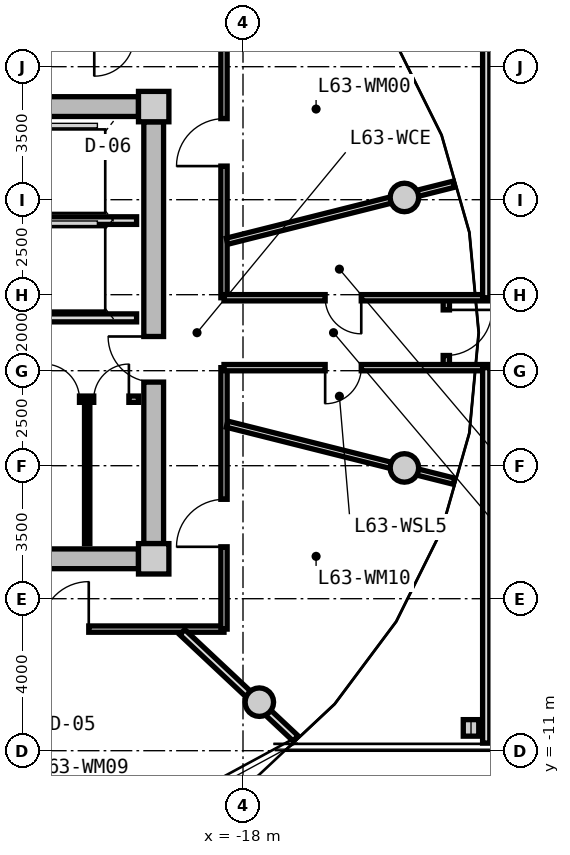
"""IFC4 building model, lengths in metres.
Left out: names, types, materials, properties, quantities, classifications, styles, units other than length and angle.
Written with IfcOpenShell. Run it as: python <this file> out.ifc"""

import sys

from ifc_helpers import new_model, si_unit, direction, frame, frame_2d, origin, origin_2d, place, context, subcontext, project, spatial, rectangle, circle, i_section, extrude, source, transform, mapped, element, fill, save


model = new_model("IFC4")
c1 = context("Model", 3, precision=1e-05, world=origin(), true_north=direction((0.0, 1.0)))
c2 = subcontext(c1, "Body", "Model", "MODEL_VIEW")
j1 = project(units=[si_unit("LENGTHUNIT", "METRE"), si_unit("PLANEANGLEUNIT", "RADIAN")], contexts=[c1])
p1 = place(None, origin())
s1 = spatial("IfcSite", under=j1, at=p1, CompositionType="ELEMENT")
p2 = place(p1, origin())
s2 = spatial("IfcBuilding", under=s1, at=p2, CompositionType="ELEMENT")
p3 = place(p2, frame((0.0, 0.0, 203.8)))
s3 = spatial("IfcBuildingStorey", under=s2, at=p3, CompositionType="ELEMENT", Elevation=203.8)
m1 = source(origin(), c2, "Body", "SweptSolid", [
    extrude(rectangle(XDim=0.8, YDim=0.8, at=origin_2d()), origin(), (0.0, 0.0, 1.0), 4.0),
])
for number, where, z_axis, x_axis in (
    (1, (-20.35, -5.95, 0.0), (0.0, 0.0, 1.0), (1.0, 0.0, 0.0)),
    (2, (-20.35, 5.95, 0.0), (0.0, 0.0, 1.0), (1.0, 0.0, 0.0)),
):
    element("IfcColumn", number, at=place(p3, frame(where, z_axis=z_axis, x_axis=x_axis)), inside=s3, PredefinedType="COLUMN", context=c2, shape_type="MappedRepresentation", body=[
        mapped(m1, transform((0.0, 0.0, 0.0), x_axis=(1.0, 0.0, 0.0), y_axis=(0.0, 1.0, 0.0), z_axis=(0.0, 0.0, 1.0), scale=1.0)),
    ])
m2 = source(origin(), c2, "Body", "SweptSolid", [
    extrude(rectangle(XDim=14.5, YDim=0.52, at=frame_2d((7.25, 0.0))), origin(), (0.0, 0.0, 1.0), 3.71),
])
for number, where, z_axis, x_axis in (
    (3, (-35.25, 5.95, 0.0), (0.0, 0.0, 1.0), (1.0, 0.0, 0.0)),
    (4, (-20.75, -5.95, 0.0), (0.0, 0.0, 1.0), (-1.0, 0.0, 0.0)),
):
    element("IfcWall", number, at=place(p3, frame(where, z_axis=z_axis, x_axis=x_axis)), inside=s3, PredefinedType="SHEAR", context=c2, shape_type="MappedRepresentation", body=[
        mapped(m2, transform((0.0, 0.0, 0.0), x_axis=(1.0, 0.0, 0.0), y_axis=(0.0, 1.0, 0.0), z_axis=(0.0, 0.0, 1.0), scale=1.0)),
    ])
m3 = source(origin(), c2, "Body", "SweptSolid", [
    extrude(rectangle(XDim=11.1, YDim=0.52, at=frame_2d((5.55, 0.0))), origin(), (0.0, 0.0, 1.0), 3.71),
])
p4 = place(p3, frame((-20.35, 5.55, 0.0), z_axis=(0.0, 0.0, 1.0), x_axis=(0.0, -1.0, 0.0)))
e5 = element("IfcWall", 5, at=p4, inside=s3, PredefinedType="SHEAR", context=c2, shape_type="MappedRepresentation", body=[
    mapped(m3, transform((0.0, 0.0, 0.0), x_axis=(1.0, 0.0, 0.0), y_axis=(0.0, 1.0, 0.0), z_axis=(0.0, 0.0, 1.0), scale=1.0)),
])
p5 = place(p4, frame((5.65, 0.0, 0.0)))
e6 = element("IfcOpeningElement", 6, at=p5, cuts=e5, PredefinedType="OPENING", context=c2, shape_type="SweptSolid", body=[
    extrude(rectangle(XDim=1.2, YDim=2.15, at=frame_2d((0.6, 1.075))), frame((0.0, 0.27, 0.0), z_axis=(0.0, -1.0, 0.0), x_axis=(1.0, 0.0, 0.0)), (0.0, 0.0, 1.0), 0.54),
])
m4 = source(origin(), c2, "Body", "SweptSolid", [
    extrude(circle(Radius=0.375, at=origin_2d()), origin(), (0.0, 0.0, 1.0), 4.0),
])
for number, where, z_axis, x_axis in (
    (7, (-13.753, 3.559, 0.0), (0.0, 0.0, 1.0), (1.0, 0.0, 0.0)),
    (8, (-17.57, -9.723, 0.0), (0.0, 0.0, 1.0), (1.0, 0.0, 0.0)),
    (9, (-13.753, -3.559, 0.0), (0.0, 0.0, 1.0), (1.0, 0.0, 0.0)),
):
    element("IfcColumn", number, at=place(p3, frame(where, z_axis=z_axis, x_axis=x_axis)), inside=s3, PredefinedType="COLUMN", context=c2, shape_type="MappedRepresentation", body=[
        mapped(m4, transform((0.0, 0.0, 0.0), x_axis=(1.0, 0.0, 0.0), y_axis=(0.0, 1.0, 0.0), z_axis=(0.0, 0.0, 1.0), scale=1.0)),
    ])
m5 = source(origin(), c2, "Body", "SweptSolid", [
    extrude(i_section(OverallWidth=0.407, OverallDepth=0.435, WebThickness=0.024, FlangeThickness=0.039, FilletRadius=0.015, at=origin_2d()), origin(), (0.0, 0.0, 1.0), 4.0),
])
p6 = place(p3, frame((-12.0, -10.4, 0.0), z_axis=(0.0, 0.0, 1.0), x_axis=(1.0, 0.0, 0.0)))
e10 = element("IfcColumn", 10, at=p6, inside=s3, PredefinedType="COLUMN", context=c2, shape_type="MappedRepresentation", body=[
    mapped(m5, transform((0.0, 0.0, 0.0), x_axis=(1.0, 0.0, 0.0), y_axis=(0.0, 1.0, 0.0), z_axis=(0.0, 0.0, 1.0), scale=1.0)),
])
m6 = source(origin(), c2, "Body", "SweptSolid", [
    extrude(rectangle(XDim=3.2, YDim=0.2, at=frame_2d((1.6, 0.0))), origin(), (0.0, 0.0, 1.0), 3.695),
])
p7 = place(p3, frame((-24.0, 2.95, 0.0), z_axis=(0.0, 0.0, 1.0), x_axis=(1.0, 0.0, 0.0)))
e11 = element("IfcWall", 11, at=p7, inside=s3, PredefinedType="PARTITIONING", context=c2, shape_type="MappedRepresentation", body=[
    mapped(m6, transform((0.0, 0.0, 0.0), x_axis=(1.0, 0.0, 0.0), y_axis=(0.0, 1.0, 0.0), z_axis=(0.0, 0.0, 1.0), scale=1.0)),
])
m7 = source(origin(), c2, "Body", "SweptSolid", [
    extrude(rectangle(XDim=6.66, YDim=0.21, at=frame_2d((3.33, 0.0))), origin(), (0.0, 0.0, 1.0), 3.695),
])
p8 = place(p3, frame((-27.46, 0.39, 0.0), z_axis=(0.0, 0.0, 1.0), x_axis=(1.0, 0.0, 0.0)))
e12 = element("IfcWall", 12, at=p8, inside=s3, PredefinedType="PARTITIONING", context=c2, shape_type="MappedRepresentation", body=[
    mapped(m7, transform((0.0, 0.0, 0.0), x_axis=(1.0, 0.0, 0.0), y_axis=(0.0, 1.0, 0.0), z_axis=(0.0, 0.0, 1.0), scale=1.0)),
])
p9 = place(p8, frame((1.0, 0.0, 0.0)))
e13 = element("IfcOpeningElement", 13, at=p9, cuts=e12, PredefinedType="OPENING", context=c2, shape_type="SweptSolid", body=[
    extrude(rectangle(XDim=1.2, YDim=2.15, at=frame_2d((0.6, 1.075))), frame((0.0, 0.115, 0.0), z_axis=(0.0, -1.0, 0.0), x_axis=(1.0, 0.0, 0.0)), (0.0, 0.0, 1.0), 0.23),
])
m8 = source(origin(), c2, "Body", "SweptSolid", [
    extrude(rectangle(XDim=2.7, YDim=0.165, at=frame_2d((1.35, 0.0))), origin(), (0.0, 0.0, 1.0), 3.695),
])
p10 = place(p3, frame((-23.45, -1.75, 0.0), z_axis=(0.0, 0.0, 1.0), x_axis=(1.0, 0.0, 0.0)))
e14 = element("IfcWall", 14, at=p10, inside=s3, PredefinedType="PARTITIONING", context=c2, shape_type="MappedRepresentation", body=[
    mapped(m8, transform((0.0, 0.0, 0.0), x_axis=(1.0, 0.0, 0.0), y_axis=(0.0, 1.0, 0.0), z_axis=(0.0, 0.0, 1.0), scale=1.0)),
])
p11 = place(p10, frame((0.222, 0.0, 0.0)))
e15 = element("IfcOpeningElement", 15, at=p11, cuts=e14, PredefinedType="OPENING", context=c2, shape_type="SweptSolid", body=[
    extrude(rectangle(XDim=0.925, YDim=2.1, at=frame_2d((0.462, 1.05))), frame((0.0, 0.093, 0.0), z_axis=(0.0, -1.0, 0.0), x_axis=(1.0, 0.0, 0.0)), (0.0, 0.0, 1.0), 0.185),
])
p12 = place(p10, frame((1.522, 0.0, 0.0)))
e16 = element("IfcOpeningElement", 16, at=p12, cuts=e14, PredefinedType="OPENING", context=c2, shape_type="SweptSolid", body=[
    extrude(rectangle(XDim=0.925, YDim=2.1, at=frame_2d((0.462, 1.05))), frame((0.0, 0.093, 0.0), z_axis=(0.0, -1.0, 0.0), x_axis=(1.0, 0.0, 0.0)), (0.0, 0.0, 1.0), 0.185),
])
m9 = source(origin(), c2, "Body", "SweptSolid", [
    extrude(rectangle(XDim=3.8, YDim=0.14, at=frame_2d((1.9, 0.0))), origin(), (0.0, 0.0, 1.0), 3.695),
])
p13 = place(p3, frame((-22.1, -5.55, 0.0), z_axis=(0.0, 0.0, 1.0), x_axis=(0.0, 1.0, 0.0)))
e17 = element("IfcWall", 17, at=p13, inside=s3, PredefinedType="PARTITIONING", context=c2, shape_type="MappedRepresentation", body=[
    mapped(m9, transform((0.0, 0.0, 0.0), x_axis=(1.0, 0.0, 0.0), y_axis=(0.0, 1.0, 0.0), z_axis=(0.0, 0.0, 1.0), scale=1.0)),
])
m10 = source(origin(), c2, "Body", "SweptSolid", [
    extrude(rectangle(XDim=19.0, YDim=0.165, at=frame_2d((9.5, 0.0))), origin(), (0.0, 0.0, 1.0), 3.695),
])
p14 = place(p3, frame((-18.5, -7.8, 0.0), z_axis=(0.0, 0.0, 1.0), x_axis=(-1.0, 0.0, 0.0)))
e18 = element("IfcWall", 18, at=p14, inside=s3, PredefinedType="PARTITIONING", context=c2, shape_type="MappedRepresentation", body=[
    mapped(m10, transform((0.0, 0.0, 0.0), x_axis=(1.0, 0.0, 0.0), y_axis=(0.0, 1.0, 0.0), z_axis=(0.0, 0.0, 1.0), scale=1.0)),
])
p15 = place(p14, frame((15.586, 0.0, 0.0)))
e19 = element("IfcOpeningElement", 19, at=p15, cuts=e18, PredefinedType="OPENING", context=c2, shape_type="SweptSolid", body=[
    extrude(rectangle(XDim=1.05, YDim=2.15, at=frame_2d((0.525, 1.075))), frame((0.0, 0.093, 0.0), z_axis=(0.0, -1.0, 0.0), x_axis=(1.0, 0.0, 0.0)), (0.0, 0.0, 1.0), 0.185),
])
p16 = place(p14, frame((12.465, 0.0, 0.0)))
e20 = element("IfcOpeningElement", 20, at=p16, cuts=e18, PredefinedType="OPENING", context=c2, shape_type="SweptSolid", body=[
    extrude(rectangle(XDim=1.05, YDim=2.15, at=frame_2d((0.525, 1.075))), frame((0.0, 0.093, 0.0), z_axis=(0.0, -1.0, 0.0), x_axis=(1.0, 0.0, 0.0)), (0.0, 0.0, 1.0), 0.185),
])
p17 = place(p14, frame((8.875, 0.0, 0.0)))
e21 = element("IfcOpeningElement", 21, at=p17, cuts=e18, PredefinedType="OPENING", context=c2, shape_type="SweptSolid", body=[
    extrude(rectangle(XDim=1.25, YDim=2.2, at=frame_2d((0.625, 1.1))), frame((0.0, 0.093, 0.0), z_axis=(0.0, -1.0, 0.0), x_axis=(1.0, 0.0, 0.0)), (0.0, 0.0, 1.0), 0.185),
])
p18 = place(p14, frame((3.559, 0.0, 0.0)))
e22 = element("IfcOpeningElement", 22, at=p18, cuts=e18, PredefinedType="OPENING", context=c2, shape_type="SweptSolid", body=[
    extrude(rectangle(XDim=1.25, YDim=2.2, at=frame_2d((0.625, 1.1))), frame((0.0, 0.093, 0.0), z_axis=(0.0, -1.0, 0.0), x_axis=(1.0, 0.0, 0.0)), (0.0, 0.0, 1.0), 0.185),
])
m11 = source(origin(), c2, "Body", "SweptSolid", [
    extrude(rectangle(XDim=6.88, YDim=0.165, at=frame_2d((3.44, 0.0))), origin(), (0.0, 0.0, 1.0), 3.695),
])
p19 = place(p3, frame((-18.5, 7.8, 0.0), z_axis=(0.0, 0.0, 1.0), x_axis=(0.0, -1.0, 0.0)))
e23 = element("IfcWall", 23, at=p19, inside=s3, PredefinedType="PARTITIONING", context=c2, shape_type="MappedRepresentation", body=[
    mapped(m11, transform((0.0, 0.0, 0.0), x_axis=(1.0, 0.0, 0.0), y_axis=(0.0, 1.0, 0.0), z_axis=(0.0, 0.0, 1.0), scale=1.0)),
])
p20 = place(p19, frame((2.166, 0.0, 0.0)))
e24 = element("IfcOpeningElement", 24, at=p20, cuts=e23, PredefinedType="OPENING", context=c2, shape_type="SweptSolid", body=[
    extrude(rectangle(XDim=1.25, YDim=2.2, at=frame_2d((0.625, 1.1))), frame((0.0, 0.093, 0.0), z_axis=(0.0, -1.0, 0.0), x_axis=(1.0, 0.0, 0.0)), (0.0, 0.0, 1.0), 0.185),
])
p21 = place(p3, frame((-18.5, -0.92, 0.0), z_axis=(0.0, 0.0, 1.0), x_axis=(0.0, -1.0, 0.0)))
e25 = element("IfcWall", 25, at=p21, inside=s3, PredefinedType="PARTITIONING", context=c2, shape_type="MappedRepresentation", body=[
    mapped(m11, transform((0.0, 0.0, 0.0), x_axis=(1.0, 0.0, 0.0), y_axis=(0.0, 1.0, 0.0), z_axis=(0.0, 0.0, 1.0), scale=1.0)),
])
p22 = place(p21, frame((3.464, 0.0, 0.0)))
e26 = element("IfcOpeningElement", 26, at=p22, cuts=e25, PredefinedType="OPENING", context=c2, shape_type="SweptSolid", body=[
    extrude(rectangle(XDim=1.25, YDim=2.2, at=frame_2d((0.625, 1.1))), frame((0.0, 0.093, 0.0), z_axis=(0.0, -1.0, 0.0), x_axis=(1.0, 0.0, 0.0)), (0.0, 0.0, 1.0), 0.185),
])
m12 = source(origin(), c2, "Body", "SweptSolid", [
    extrude(rectangle(XDim=6.157, YDim=0.165, at=frame_2d((3.079, 0.0))), origin(), (0.0, 0.0, 1.0), 3.295),
])
for number, where, z_axis, x_axis in (
    (27, (-18.42, -2.407, 0.0), (0.0, 0.0, 1.0), (0.97, -0.244, 0.0)),
    (28, (-18.42, 2.407, 0.0), (0.0, 0.0, 1.0), (0.97, 0.244, 0.0)),
):
    element("IfcWall", number, at=place(p3, frame(where, z_axis=z_axis, x_axis=x_axis)), inside=s3, PredefinedType="PARTITIONING", context=c2, shape_type="MappedRepresentation", body=[
        mapped(m12, transform((0.0, 0.0, 0.0), x_axis=(1.0, 0.0, 0.0), y_axis=(0.0, 1.0, 0.0), z_axis=(0.0, 0.0, 1.0), scale=1.0)),
    ])
m13 = source(origin(), c2, "Body", "SweptSolid", [
    extrude(rectangle(XDim=4.089, YDim=0.19, at=frame_2d((2.044, 0.0))), origin(), (0.0, 0.0, 1.0), 3.295),
])
p23 = place(p3, frame((-19.598, -7.88, 0.0), z_axis=(0.0, 0.0, 1.0), x_axis=(0.729401273609, -0.684086092577, 0.0)))
e29 = element("IfcWall", 29, at=p23, inside=s3, PredefinedType="PARTITIONING", context=c2, shape_type="MappedRepresentation", body=[
    mapped(m13, transform((0.0, 0.0, 0.0), x_axis=(1.0, 0.0, 0.0), y_axis=(0.0, 1.0, 0.0), z_axis=(0.0, 0.0, 1.0), scale=1.0)),
])
m14 = source(origin(), c2, "Body", "SweptSolid", [
    extrude(rectangle(XDim=1.84, YDim=0.165, at=frame_2d((0.92, 0.0))), origin(), (0.0, 0.0, 1.0), 3.695),
])
p24 = place(p3, frame((-12.65, -0.92, 0.0), z_axis=(0.0, 0.0, 1.0), x_axis=(0.0, 1.0, 0.0)))
e30 = element("IfcWall", 30, at=p24, inside=s3, PredefinedType="PARTITIONING", context=c2, shape_type="MappedRepresentation", body=[
    mapped(m14, transform((0.0, 0.0, 0.0), x_axis=(1.0, 0.0, 0.0), y_axis=(0.0, 1.0, 0.0), z_axis=(0.0, 0.0, 1.0), scale=1.0)),
])
p25 = place(p24, frame((0.32, 0.0, 0.0)))
e31 = element("IfcOpeningElement", 31, at=p25, cuts=e30, PredefinedType="OPENING", context=c2, shape_type="SweptSolid", body=[
    extrude(rectangle(XDim=1.2, YDim=2.15, at=frame_2d((0.6, 1.075))), frame((0.0, 0.093, 0.0), z_axis=(0.0, -1.0, 0.0), x_axis=(1.0, 0.0, 0.0)), (0.0, 0.0, 1.0), 0.185),
])
m15 = source(origin(), c2, "Body", "SweptSolid", [
    extrude(rectangle(XDim=37.0, YDim=0.165, at=frame_2d((18.5, 0.0))), origin(), (0.0, 0.0, 1.0), 3.695),
])
p26 = place(p3, frame((-18.5, -0.92, 0.0), z_axis=(0.0, 0.0, 1.0), x_axis=(1.0, 0.0, 0.0)))
e32 = element("IfcWall", 32, at=p26, inside=s3, PredefinedType="PARTITIONING", context=c2, shape_type="MappedRepresentation", body=[
    mapped(m15, transform((0.0, 0.0, 0.0), x_axis=(1.0, 0.0, 0.0), y_axis=(0.0, 1.0, 0.0), z_axis=(0.0, 0.0, 1.0), scale=1.0)),
])
p27 = place(p26, frame((2.662, 0.0, 0.0)))
e33 = element("IfcOpeningElement", 33, at=p27, cuts=e32, PredefinedType="OPENING", context=c2, shape_type="SweptSolid", body=[
    extrude(rectangle(XDim=0.95, YDim=2.1, at=frame_2d((0.475, 1.05))), frame((0.0, 0.093, 0.0), z_axis=(0.0, -1.0, 0.0), x_axis=(1.0, 0.0, 0.0)), (0.0, 0.0, 1.0), 0.185),
])
p28 = place(p26, frame((33.388, 0.0, 0.0)))
e34 = element("IfcOpeningElement", 34, at=p28, cuts=e32, PredefinedType="OPENING", context=c2, shape_type="SweptSolid", body=[
    extrude(rectangle(XDim=0.95, YDim=2.1, at=frame_2d((0.475, 1.05))), frame((0.0, 0.093, 0.0), z_axis=(0.0, -1.0, 0.0), x_axis=(1.0, 0.0, 0.0)), (0.0, 0.0, 1.0), 0.185),
])
p29 = place(p26, frame((9.075, 0.0, 0.0)))
e35 = element("IfcOpeningElement", 35, at=p29, cuts=e32, PredefinedType="OPENING", context=c2, shape_type="SweptSolid", body=[
    extrude(rectangle(XDim=1.25, YDim=2.2, at=frame_2d((0.625, 1.1))), frame((0.0, 0.093, 0.0), z_axis=(0.0, -1.0, 0.0), x_axis=(1.0, 0.0, 0.0)), (0.0, 0.0, 1.0), 0.185),
])
p30 = place(p26, frame((17.875, 0.0, 0.0)))
e36 = element("IfcOpeningElement", 36, at=p30, cuts=e32, PredefinedType="OPENING", context=c2, shape_type="SweptSolid", body=[
    extrude(rectangle(XDim=1.25, YDim=2.2, at=frame_2d((0.625, 1.1))), frame((0.0, 0.093, 0.0), z_axis=(0.0, -1.0, 0.0), x_axis=(1.0, 0.0, 0.0)), (0.0, 0.0, 1.0), 0.185),
])
p31 = place(p26, frame((26.675, 0.0, 0.0)))
e37 = element("IfcOpeningElement", 37, at=p31, cuts=e32, PredefinedType="OPENING", context=c2, shape_type="SweptSolid", body=[
    extrude(rectangle(XDim=1.25, YDim=2.2, at=frame_2d((0.625, 1.1))), frame((0.0, 0.093, 0.0), z_axis=(0.0, -1.0, 0.0), x_axis=(1.0, 0.0, 0.0)), (0.0, 0.0, 1.0), 0.185),
])
p32 = place(p3, frame((-18.5, 0.92, 0.0), z_axis=(0.0, 0.0, 1.0), x_axis=(1.0, 0.0, 0.0)))
e38 = element("IfcWall", 38, at=p32, inside=s3, PredefinedType="PARTITIONING", context=c2, shape_type="MappedRepresentation", body=[
    mapped(m15, transform((0.0, 0.0, 0.0), x_axis=(1.0, 0.0, 0.0), y_axis=(0.0, 1.0, 0.0), z_axis=(0.0, 0.0, 1.0), scale=1.0)),
])
p33 = place(p32, frame((2.662, 0.0, 0.0)))
e39 = element("IfcOpeningElement", 39, at=p33, cuts=e38, PredefinedType="OPENING", context=c2, shape_type="SweptSolid", body=[
    extrude(rectangle(XDim=0.95, YDim=2.1, at=frame_2d((0.475, 1.05))), frame((0.0, 0.093, 0.0), z_axis=(0.0, -1.0, 0.0), x_axis=(1.0, 0.0, 0.0)), (0.0, 0.0, 1.0), 0.185),
])
p34 = place(p32, frame((33.388, 0.0, 0.0)))
e40 = element("IfcOpeningElement", 40, at=p34, cuts=e38, PredefinedType="OPENING", context=c2, shape_type="SweptSolid", body=[
    extrude(rectangle(XDim=0.95, YDim=2.1, at=frame_2d((0.475, 1.05))), frame((0.0, 0.093, 0.0), z_axis=(0.0, -1.0, 0.0), x_axis=(1.0, 0.0, 0.0)), (0.0, 0.0, 1.0), 0.185),
])
p35 = place(p32, frame((7.64, 0.0, 0.0)))
e41 = element("IfcOpeningElement", 41, at=p35, cuts=e38, PredefinedType="OPENING", context=c2, shape_type="SweptSolid", body=[
    extrude(rectangle(XDim=0.92, YDim=2.1, at=frame_2d((0.46, 1.05))), frame((0.0, 0.093, 0.0), z_axis=(0.0, -1.0, 0.0), x_axis=(1.0, 0.0, 0.0)), (0.0, 0.0, 1.0), 0.185),
])
p36 = place(p32, frame((10.275, 0.0, 0.0)))
e42 = element("IfcOpeningElement", 42, at=p36, cuts=e38, PredefinedType="OPENING", context=c2, shape_type="SweptSolid", body=[
    extrude(rectangle(XDim=1.25, YDim=2.2, at=frame_2d((0.625, 1.1))), frame((0.0, 0.093, 0.0), z_axis=(0.0, -1.0, 0.0), x_axis=(1.0, 0.0, 0.0)), (0.0, 0.0, 1.0), 0.185),
])
p37 = place(p32, frame((17.875, 0.0, 0.0)))
e43 = element("IfcOpeningElement", 43, at=p37, cuts=e38, PredefinedType="OPENING", context=c2, shape_type="SweptSolid", body=[
    extrude(rectangle(XDim=1.25, YDim=2.2, at=frame_2d((0.625, 1.1))), frame((0.0, 0.093, 0.0), z_axis=(0.0, -1.0, 0.0), x_axis=(1.0, 0.0, 0.0)), (0.0, 0.0, 1.0), 0.185),
])
p38 = place(p32, frame((26.675, 0.0, 0.0)))
e44 = element("IfcOpeningElement", 44, at=p38, cuts=e38, PredefinedType="OPENING", context=c2, shape_type="SweptSolid", body=[
    extrude(rectangle(XDim=1.25, YDim=2.2, at=frame_2d((0.625, 1.1))), frame((0.0, 0.093, 0.0), z_axis=(0.0, -1.0, 0.0), x_axis=(1.0, 0.0, 0.0)), (0.0, 0.0, 1.0), 0.185),
])
m16 = source(origin(), c2, "Body", "SweptSolid", [
    extrude(rectangle(XDim=9.88, YDim=0.19, at=frame_2d((4.94, 0.0))), origin(), (0.0, 0.0, 1.0), 3.695),
])
for number, where, z_axis, x_axis in (
    (45, (-11.6, -10.8, 0.0), (0.0, 0.0, 1.0), (0.0, 1.0, 0.0)),
    (46, (-11.6, 0.92, 0.0), (0.0, 0.0, 1.0), (0.0, 1.0, 0.0)),
):
    element("IfcWall", number, at=place(p3, frame(where, z_axis=z_axis, x_axis=x_axis)), inside=s3, PredefinedType="PARTITIONING", context=c2, shape_type="MappedRepresentation", body=[
        mapped(m16, transform((0.0, 0.0, 0.0), x_axis=(1.0, 0.0, 0.0), y_axis=(0.0, 1.0, 0.0), z_axis=(0.0, 0.0, 1.0), scale=1.0)),
    ])
m17 = source(origin(), c2, "Body", "SweptSolid", [
    extrude(rectangle(XDim=1.2, YDim=2.15, at=frame_2d((0.6, 1.075))), frame((0.0, 0.025, 0.0), z_axis=(0.0, -1.0, 0.0), x_axis=(1.0, 0.0, 0.0)), (0.0, 0.0, 1.0), 0.05),
])
p39 = place(p5, frame((1.2, 0.0, 0.0), z_axis=(0.0, 0.0, 1.0), x_axis=(-1.0, 0.0, 0.0)))
e47 = element("IfcDoor", 47, at=p39, inside=s3, OperationType="SINGLE_SWING_RIGHT", PredefinedType="DOOR", context=c2, shape_type="MappedRepresentation", body=[
    mapped(m17, transform((0.0, 0.0, 0.0), x_axis=(1.0, 0.0, 0.0), y_axis=(0.0, 1.0, 0.0), z_axis=(0.0, 0.0, 1.0), scale=1.0)),
])
fill(e6, e47)
m18 = source(origin(), c2, "Body", "SweptSolid", [
    extrude(rectangle(XDim=0.925, YDim=2.1, at=frame_2d((0.462, 1.05))), frame((0.0, 0.025, 0.0), z_axis=(0.0, -1.0, 0.0), x_axis=(1.0, 0.0, 0.0)), (0.0, 0.0, 1.0), 0.05),
])
p40 = place(p11, origin())
e48 = element("IfcDoor", 48, at=p40, inside=s3, OperationType="SINGLE_SWING_LEFT", PredefinedType="DOOR", context=c2, shape_type="MappedRepresentation", body=[
    mapped(m18, transform((0.0, 0.0, 0.0), x_axis=(1.0, 0.0, 0.0), y_axis=(0.0, 1.0, 0.0), z_axis=(0.0, 0.0, 1.0), scale=1.0)),
])
fill(e15, e48)
p41 = place(p12, origin())
e49 = element("IfcDoor", 49, at=p41, inside=s3, OperationType="SINGLE_SWING_RIGHT", PredefinedType="DOOR", context=c2, shape_type="MappedRepresentation", body=[
    mapped(m18, transform((0.0, 0.0, 0.0), x_axis=(1.0, 0.0, 0.0), y_axis=(0.0, 1.0, 0.0), z_axis=(0.0, 0.0, 1.0), scale=1.0)),
])
fill(e16, e49)
m19 = source(origin(), c2, "Body", "SweptSolid", [
    extrude(rectangle(XDim=0.95, YDim=2.1, at=frame_2d((0.475, 1.05))), frame((0.0, 0.025, 0.0), z_axis=(0.0, -1.0, 0.0), x_axis=(1.0, 0.0, 0.0)), (0.0, 0.0, 1.0), 0.05),
])
p42 = place(p27, frame((0.95, 0.0, 0.0), z_axis=(0.0, 0.0, 1.0), x_axis=(-1.0, 0.0, 0.0)))
e50 = element("IfcDoor", 50, at=p42, inside=s3, OperationType="SINGLE_SWING_RIGHT", PredefinedType="DOOR", context=c2, shape_type="MappedRepresentation", body=[
    mapped(m19, transform((0.0, 0.0, 0.0), x_axis=(1.0, 0.0, 0.0), y_axis=(0.0, 1.0, 0.0), z_axis=(0.0, 0.0, 1.0), scale=1.0)),
])
fill(e33, e50)
p43 = place(p33, frame((0.95, 0.0, 0.0), z_axis=(0.0, 0.0, 1.0), x_axis=(-1.0, 0.0, 0.0)))
e51 = element("IfcDoor", 51, at=p43, inside=s3, OperationType="SINGLE_SWING_LEFT", PredefinedType="DOOR", context=c2, shape_type="MappedRepresentation", body=[
    mapped(m19, transform((0.0, 0.0, 0.0), x_axis=(1.0, 0.0, 0.0), y_axis=(0.0, 1.0, 0.0), z_axis=(0.0, 0.0, 1.0), scale=1.0)),
])
fill(e39, e51)
m20 = source(origin(), c2, "Body", "SweptSolid", [
    extrude(rectangle(XDim=1.25, YDim=2.2, at=frame_2d((0.625, 1.1))), frame((0.0, 0.025, 0.0), z_axis=(0.0, -1.0, 0.0), x_axis=(1.0, 0.0, 0.0)), (0.0, 0.0, 1.0), 0.05),
])
p44 = place(p20, frame((1.25, 0.0, 0.0), z_axis=(0.0, 0.0, 1.0), x_axis=(-1.0, 0.0, 0.0)))
e52 = element("IfcDoor", 52, at=p44, inside=s3, OperationType="SINGLE_SWING_LEFT", PredefinedType="DOOR", context=c2, shape_type="MappedRepresentation", body=[
    mapped(m20, transform((0.0, 0.0, 0.0), x_axis=(1.0, 0.0, 0.0), y_axis=(0.0, 1.0, 0.0), z_axis=(0.0, 0.0, 1.0), scale=1.0)),
])
fill(e24, e52)
p45 = place(p18, frame((1.25, 0.0, 0.0), z_axis=(0.0, 0.0, 1.0), x_axis=(-1.0, 0.0, 0.0)))
e53 = element("IfcDoor", 53, at=p45, inside=s3, OperationType="SINGLE_SWING_RIGHT", PredefinedType="DOOR", context=c2, shape_type="MappedRepresentation", body=[
    mapped(m20, transform((0.0, 0.0, 0.0), x_axis=(1.0, 0.0, 0.0), y_axis=(0.0, 1.0, 0.0), z_axis=(0.0, 0.0, 1.0), scale=1.0)),
])
fill(e22, e53)
p46 = place(p22, frame((1.25, 0.0, 0.0), z_axis=(0.0, 0.0, 1.0), x_axis=(-1.0, 0.0, 0.0)))
e54 = element("IfcDoor", 54, at=p46, inside=s3, OperationType="SINGLE_SWING_LEFT", PredefinedType="DOOR", context=c2, shape_type="MappedRepresentation", body=[
    mapped(m20, transform((0.0, 0.0, 0.0), x_axis=(1.0, 0.0, 0.0), y_axis=(0.0, 1.0, 0.0), z_axis=(0.0, 0.0, 1.0), scale=1.0)),
])
fill(e26, e54)
p47 = place(p25, frame((1.2, 0.0, 0.0), z_axis=(0.0, 0.0, 1.0), x_axis=(-1.0, 0.0, 0.0)))
e55 = element("IfcDoor", 55, at=p47, inside=s3, OperationType="SINGLE_SWING_LEFT", PredefinedType="DOOR", context=c2, shape_type="MappedRepresentation", body=[
    mapped(m17, transform((0.0, 0.0, 0.0), x_axis=(1.0, 0.0, 0.0), y_axis=(0.0, 1.0, 0.0), z_axis=(0.0, 0.0, 1.0), scale=1.0)),
])
fill(e31, e55)
save(model, sys.argv[1])
